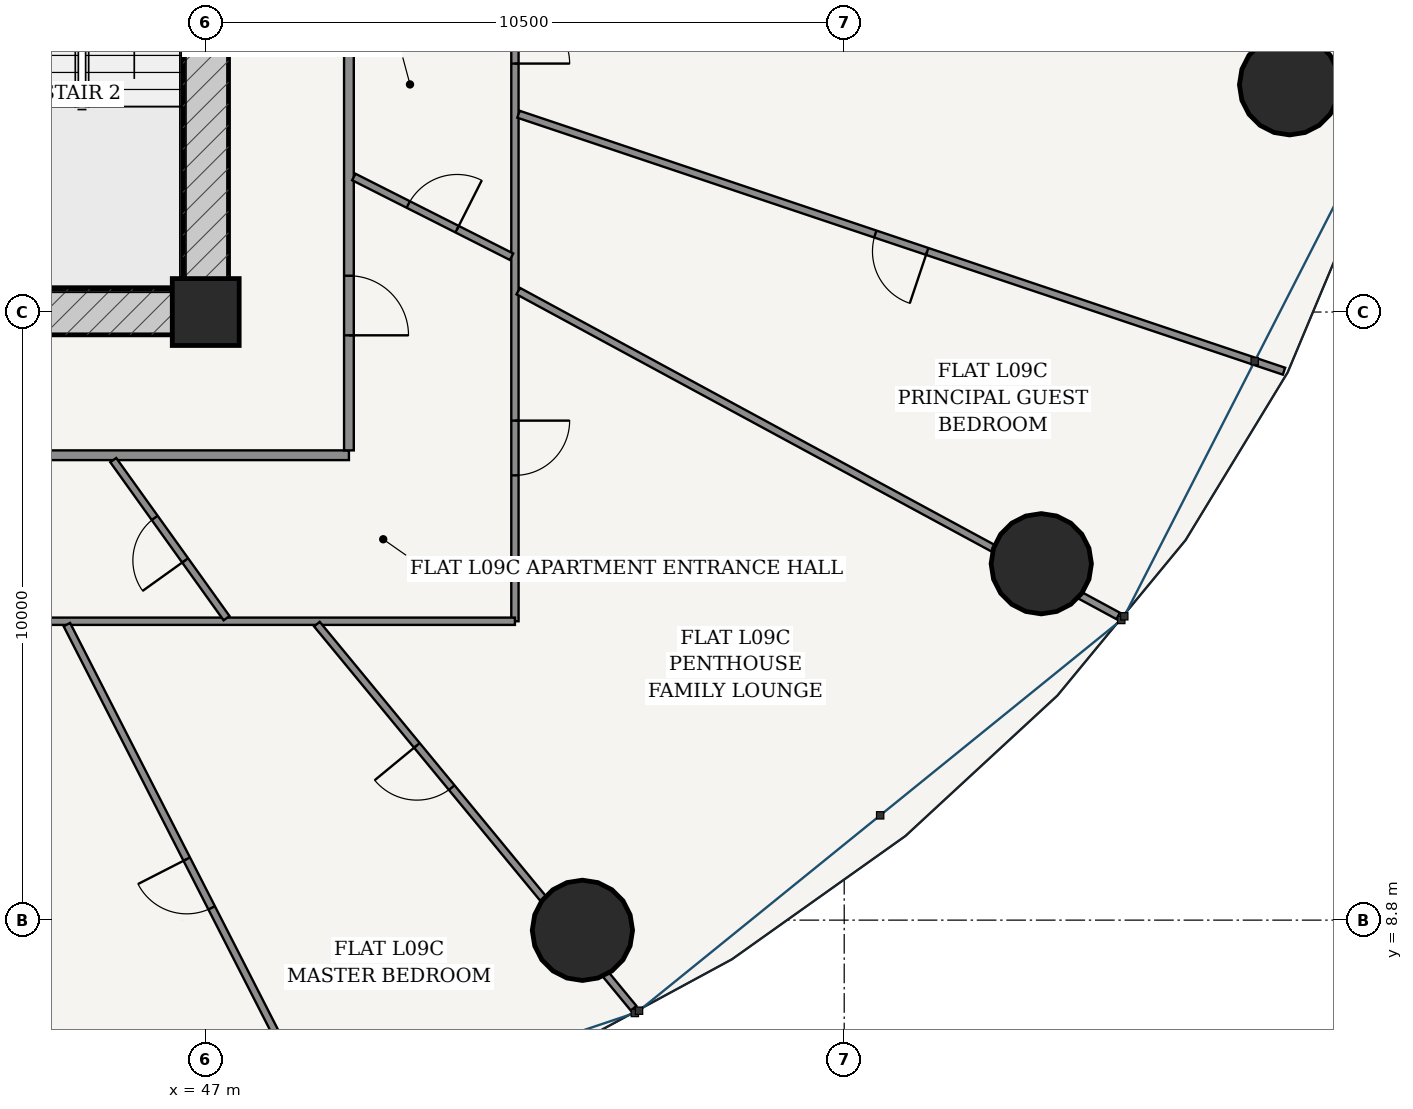
"""IFC4 building model, lengths in metres.
Left out: names, types, materials, properties, quantities, classifications, styles, units other than length and angle.
Written with IfcOpenShell. Run it as: python <this file> out.ifc"""

import sys

from ifc_helpers import new_model, si_unit, direction, frame, frame_2d, origin, origin_2d, place, context, subcontext, project, spatial, rectangle, hollow_circle, extrude, source, transform, mapped, element, fill, save


model = new_model("IFC4")
c1 = context("Model", 3, precision=1e-05, world=origin(), true_north=direction((-0.2419218956, 0.970295726276)))
c2 = subcontext(c1, "Body", "Model", "MODEL_VIEW")
j1 = project(units=[si_unit("LENGTHUNIT", "METRE"), si_unit("PLANEANGLEUNIT", "RADIAN")], contexts=[c1])
p1 = place(None, origin())
s1 = spatial("IfcSite", under=j1, at=p1, CompositionType="ELEMENT")
p2 = place(p1, origin())
s2 = spatial("IfcBuilding", under=s1, at=p2, CompositionType="ELEMENT")
p3 = place(p2, frame((0.0, 0.0, 38.4)))
s3 = spatial("IfcBuildingStorey", under=s2, at=p3, CompositionType="ELEMENT", Elevation=38.4)
p4 = place(p3, frame((47.0, 18.8, 0.0), z_axis=(0.0, 0.0, 1.0), x_axis=(1.0, 0.0, 0.0)))
e1 = element("IfcColumn", 1, at=p4, inside=s3, PredefinedType="COLUMN", context=c2, shape_type="SweptSolid", body=[
    extrude(rectangle(XDim=1.1, YDim=1.1, at=origin_2d()), origin(), (0.0, 0.0, 1.0), 3.6),
])
p5 = place(p3, frame((28.625, 18.8, 0.0), z_axis=(0.0, 0.0, 1.0), x_axis=(1.0, 0.0, 0.0)))
e2 = element("IfcWall", 2, at=p5, inside=s3, PredefinedType="SHEAR", context=c2, shape_type="SweptSolid", body=[
    extrude(rectangle(XDim=18.75, YDim=0.75, at=frame_2d((9.375, 0.0))), origin(), (0.0, 0.0, 1.0), 3.32),
])
p6 = place(p5, frame((6.927, 0.0, 0.0)))
e3 = element("IfcOpeningElement", 3, at=p6, cuts=e2, PredefinedType="OPENING", context=c2, shape_type="SweptSolid", body=[
    extrude(rectangle(XDim=0.85, YDim=2.1, at=frame_2d((0.425, 1.05))), frame((0.0, 0.385, 0.0), z_axis=(0.0, -1.0, 0.0), x_axis=(1.0, 0.0, 0.0)), (0.0, 0.0, 1.0), 0.77),
])
p7 = place(p5, frame((8.95, 0.0, 0.0)))
e4 = element("IfcOpeningElement", 4, at=p7, cuts=e2, PredefinedType="OPENING", context=c2, shape_type="SweptSolid", body=[
    extrude(rectangle(XDim=0.85, YDim=2.1, at=frame_2d((0.425, 1.05))), frame((0.0, 0.385, 0.0), z_axis=(0.0, -1.0, 0.0), x_axis=(1.0, 0.0, 0.0)), (0.0, 0.0, 1.0), 0.77),
])
p8 = place(p5, frame((10.972, 0.0, 0.0)))
e5 = element("IfcOpeningElement", 5, at=p8, cuts=e2, PredefinedType="OPENING", context=c2, shape_type="SweptSolid", body=[
    extrude(rectangle(XDim=0.85, YDim=2.1, at=frame_2d((0.425, 1.05))), frame((0.0, 0.385, 0.0), z_axis=(0.0, -1.0, 0.0), x_axis=(1.0, 0.0, 0.0)), (0.0, 0.0, 1.0), 0.77),
])
p9 = place(p3, frame((47.0, 19.175, 0.0), z_axis=(0.0, 0.0, 1.0), x_axis=(0.0, 1.0, 0.0)))
e6 = element("IfcWall", 6, at=p9, inside=s3, PredefinedType="SHEAR", context=c2, shape_type="SweptSolid", body=[
    extrude(rectangle(XDim=15.25, YDim=0.75, at=frame_2d((7.625, 0.0))), origin(), (0.0, 0.0, 1.0), 3.32),
])
p10 = place(p9, frame((9.875, 0.0, 0.0)))
e7 = element("IfcOpeningElement", 7, at=p10, cuts=e6, PredefinedType="OPENING", context=c2, shape_type="SweptSolid", body=[
    extrude(rectangle(XDim=1.5, YDim=2.2, at=frame_2d((0.75, 1.1))), frame((0.0, 0.385, 0.0), z_axis=(0.0, -1.0, 0.0), x_axis=(1.0, 0.0, 0.0)), (0.0, 0.0, 1.0), 0.77),
])
for number, where, z_axis, x_axis in (
    (8, (53.195, 8.632, 0.0), (0.0, 0.0, 1.0), (1.0, 0.0, 0.0)),
    (9, (60.741, 14.661, 0.0), (0.0, 0.0, 1.0), (1.0, 0.0, 0.0)),
    (10, (64.824, 22.537, 0.0), (0.0, 0.0, 1.0), (1.0, 0.0, 0.0)),
):
    element("IfcColumn", number, at=place(p3, frame(where, z_axis=z_axis, x_axis=x_axis)), inside=s3, PredefinedType="COLUMN", context=c2, shape_type="SweptSolid", body=[
        extrude(hollow_circle(Radius=0.825, WallThickness=0.05, at=origin_2d()), origin(), (0.0, 0.0, 1.0), 3.6),
    ])
p11 = place(p3, frame((26.645, 16.445, 0.0), z_axis=(0.0, 0.0, 1.0), x_axis=(1.0, 0.0, 0.0)))
e11 = element("IfcWall", 11, at=p11, inside=s3, PredefinedType="PARTITIONING", context=c2, shape_type="SweptSolid", body=[
    extrude(rectangle(XDim=22.71, YDim=0.16, at=frame_2d((11.355, 0.0))), origin(), (0.0, 0.0, 1.0), 2.688),
])
p12 = place(p3, frame((49.355, 16.525, 0.0), z_axis=(0.0, 0.0, 1.0), x_axis=(0.0, 1.0, 0.0)))
e12 = element("IfcWall", 12, at=p12, inside=s3, PredefinedType="PARTITIONING", context=c2, shape_type="SweptSolid", body=[
    extrude(rectangle(XDim=20.55, YDim=0.16, at=frame_2d((10.275, 0.0))), origin(), (0.0, 0.0, 1.0), 2.688),
])
p13 = place(p12, frame((17.207, 0.0, 0.0)))
e13 = element("IfcOpeningElement", 13, at=p13, cuts=e12, PredefinedType="OPENING", context=c2, shape_type="SweptSolid", body=[
    extrude(rectangle(XDim=0.98, YDim=2.2, at=frame_2d((0.49, 1.1))), frame((0.0, 0.09, 0.0), z_axis=(0.0, -1.0, 0.0), x_axis=(1.0, 0.0, 0.0)), (0.0, 0.0, 1.0), 0.18),
])
p14 = place(p12, frame((1.892, 0.0, 0.0)))
e14 = element("IfcOpeningElement", 14, at=p14, cuts=e12, PredefinedType="OPENING", context=c2, shape_type="SweptSolid", body=[
    extrude(rectangle(XDim=0.98, YDim=2.2, at=frame_2d((0.49, 1.1))), frame((0.0, 0.09, 0.0), z_axis=(0.0, -1.0, 0.0), x_axis=(1.0, 0.0, 0.0)), (0.0, 0.0, 1.0), 0.18),
])
p15 = place(p3, frame((52.085, 28.968, 0.0), z_axis=(0.0, 0.0, 1.0), x_axis=(0.0, -1.0, 0.0)))
e15 = element("IfcWall", 15, at=p15, inside=s3, PredefinedType="PARTITIONING", context=c2, shape_type="SweptSolid", body=[
    extrude(rectangle(XDim=15.253, YDim=0.12, at=frame_2d((7.626, 0.0))), origin(), (0.0, 0.0, 1.0), 2.688),
])
p16 = place(p15, frame((11.954, 0.0, 0.0)))
e16 = element("IfcOpeningElement", 16, at=p16, cuts=e15, PredefinedType="OPENING", context=c2, shape_type="SweptSolid", body=[
    extrude(rectangle(XDim=0.9, YDim=2.15, at=frame_2d((0.45, 1.075))), frame((0.0, 0.07, 0.0), z_axis=(0.0, -1.0, 0.0), x_axis=(1.0, 0.0, 0.0)), (0.0, 0.0, 1.0), 0.14),
])
p17 = place(p15, frame((5.182, 0.0, 0.0)))
e17 = element("IfcOpeningElement", 17, at=p17, cuts=e15, PredefinedType="OPENING", context=c2, shape_type="SweptSolid", body=[
    extrude(rectangle(XDim=0.9, YDim=2.15, at=frame_2d((0.45, 1.075))), frame((0.0, 0.07, 0.0), z_axis=(0.0, -1.0, 0.0), x_axis=(1.0, 0.0, 0.0)), (0.0, 0.0, 1.0), 0.14),
])
p18 = place(p15, frame((1.889, 0.0, 0.0)))
e18 = element("IfcOpeningElement", 18, at=p18, cuts=e15, PredefinedType="OPENING", context=c2, shape_type="SweptSolid", body=[
    extrude(rectangle(XDim=0.9, YDim=2.15, at=frame_2d((0.45, 1.075))), frame((0.0, 0.07, 0.0), z_axis=(0.0, -1.0, 0.0), x_axis=(1.0, 0.0, 0.0)), (0.0, 0.0, 1.0), 0.14),
])
p19 = place(p3, frame((52.085, 13.715, 0.0), z_axis=(0.0, 0.0, 1.0), x_axis=(-1.0, 0.0, 0.0)))
e19 = element("IfcWall", 19, at=p19, inside=s3, PredefinedType="PARTITIONING", context=c2, shape_type="SweptSolid", body=[
    extrude(rectangle(XDim=24.772, YDim=0.12, at=frame_2d((12.386, 0.0))), origin(), (0.0, 0.0, 1.0), 2.688),
])
p20 = place(p19, frame((20.912, 0.0, 0.0)))
e20 = element("IfcOpeningElement", 20, at=p20, cuts=e19, PredefinedType="OPENING", context=c2, shape_type="SweptSolid", body=[
    extrude(rectangle(XDim=0.86, YDim=2.15, at=frame_2d((0.43, 1.075))), frame((0.0, 0.07, 0.0), z_axis=(0.0, -1.0, 0.0), x_axis=(1.0, 0.0, 0.0)), (0.0, 0.0, 1.0), 0.14),
])
p21 = place(p19, frame((13.87, 0.0, 0.0)))
e21 = element("IfcOpeningElement", 21, at=p21, cuts=e19, PredefinedType="OPENING", context=c2, shape_type="SweptSolid", body=[
    extrude(rectangle(XDim=0.9, YDim=2.15, at=frame_2d((0.45, 1.075))), frame((0.0, 0.07, 0.0), z_axis=(0.0, -1.0, 0.0), x_axis=(1.0, 0.0, 0.0)), (0.0, 0.0, 1.0), 0.14),
])
p22 = place(p3, frame((44.717, 13.66, 0.0), z_axis=(0.0, 0.0, 1.0), x_axis=(0.455131303234, -0.890424335256, 0.0)))
e22 = element("IfcWall", 22, at=p22, inside=s3, PredefinedType="PARTITIONING", context=c2, shape_type="SweptSolid", body=[
    extrude(rectangle(XDim=9.562, YDim=0.12, at=frame_2d((4.781, 0.0))), origin(), (0.0, 0.0, 1.0), 2.762),
])
p23 = place(p22, frame((4.331, 0.0, 0.0)))
e23 = element("IfcOpeningElement", 23, at=p23, cuts=e22, PredefinedType="OPENING", context=c2, shape_type="SweptSolid", body=[
    extrude(rectangle(XDim=0.9, YDim=2.15, at=frame_2d((0.45, 1.075))), frame((0.0, 0.07, 0.0), z_axis=(0.0, -1.0, 0.0), x_axis=(1.0, 0.0, 0.0)), (0.0, 0.0, 1.0), 0.14),
])
p24 = place(p3, frame((48.829, 13.667, 0.0), z_axis=(0.0, 0.0, 1.0), x_axis=(0.636177533893, -0.771542704826, 0.0)))
e24 = element("IfcWall", 24, at=p24, inside=s3, PredefinedType="PARTITIONING", context=c2, shape_type="SweptSolid", body=[
    extrude(rectangle(XDim=8.187, YDim=0.12, at=frame_2d((4.093, 0.0))), origin(), (0.0, 0.0, 1.0), 2.688),
])
p25 = place(p24, frame((2.584, 0.0, 0.0)))
e25 = element("IfcOpeningElement", 25, at=p25, cuts=e24, PredefinedType="OPENING", context=c2, shape_type="SweptSolid", body=[
    extrude(rectangle(XDim=0.9, YDim=2.15, at=frame_2d((0.45, 1.075))), frame((0.0, 0.07, 0.0), z_axis=(0.0, -1.0, 0.0), x_axis=(1.0, 0.0, 0.0)), (0.0, 0.0, 1.0), 0.14),
])
p26 = place(p3, frame((52.139, 19.144, 0.0), z_axis=(0.0, 0.0, 1.0), x_axis=(0.879372452045, -0.476134529922, 0.0)))
e26 = element("IfcWall", 26, at=p26, inside=s3, PredefinedType="PARTITIONING", context=c2, shape_type="SweptSolid", body=[
    extrude(rectangle(XDim=11.219, YDim=0.12, at=frame_2d((5.61, 0.0))), origin(), (0.0, 0.0, 1.0), 2.688),
])
p27 = place(p3, frame((52.144, 22.052, 0.0), z_axis=(0.0, 0.0, 1.0), x_axis=(0.948023034133, -0.318201707653, 0.0)))
e27 = element("IfcWall", 27, at=p27, inside=s3, PredefinedType="PARTITIONING", context=c2, shape_type="SweptSolid", body=[
    extrude(rectangle(XDim=13.279, YDim=0.12, at=frame_2d((6.639, 0.0))), origin(), (0.0, 0.0, 1.0), 2.762),
])
p28 = place(p27, frame((6.189, 0.0, 0.0)))
e28 = element("IfcOpeningElement", 28, at=p28, cuts=e27, PredefinedType="OPENING", context=c2, shape_type="SweptSolid", body=[
    extrude(rectangle(XDim=0.9, YDim=2.15, at=frame_2d((0.45, 1.075))), frame((0.0, 0.07, 0.0), z_axis=(0.0, -1.0, 0.0), x_axis=(1.0, 0.0, 0.0)), (0.0, 0.0, 1.0), 0.14),
])
p29 = place(p3, frame((45.48, 16.365, 0.0), z_axis=(0.0, 0.0, 1.0), x_axis=(0.582566008831, -0.812783393872, 0.0)))
e29 = element("IfcWall", 29, at=p29, inside=s3, PredefinedType="PARTITIONING", context=c2, shape_type="SweptSolid", body=[
    extrude(rectangle(XDim=3.198, YDim=0.12, at=frame_2d((1.599, 0.0))), origin(), (0.0, 0.0, 1.0), 3.32),
])
p30 = place(p29, frame((1.169, 0.0, 0.0)))
e30 = element("IfcOpeningElement", 30, at=p30, cuts=e29, PredefinedType="OPENING", context=c2, shape_type="SweptSolid", body=[
    extrude(rectangle(XDim=0.86, YDim=2.15, at=frame_2d((0.43, 1.075))), frame((0.0, 0.07, 0.0), z_axis=(0.0, -1.0, 0.0), x_axis=(1.0, 0.0, 0.0)), (0.0, 0.0, 1.0), 0.14),
])
p31 = place(p3, frame((49.435, 21.021, 0.0), z_axis=(0.0, 0.0, 1.0), x_axis=(0.892504324967, -0.451038834155, 0.0)))
e31 = element("IfcWall", 31, at=p31, inside=s3, PredefinedType="PARTITIONING", context=c2, shape_type="SweptSolid", body=[
    extrude(rectangle(XDim=2.907, YDim=0.12, at=frame_2d((1.454, 0.0))), origin(), (0.0, 0.0, 1.0), 3.32),
])
p32 = place(p31, frame((1.004, 0.0, 0.0)))
e32 = element("IfcOpeningElement", 32, at=p32, cuts=e31, PredefinedType="OPENING", context=c2, shape_type="SweptSolid", body=[
    extrude(rectangle(XDim=0.9, YDim=2.15, at=frame_2d((0.45, 1.075))), frame((0.0, 0.07, 0.0), z_axis=(0.0, -1.0, 0.0), x_axis=(1.0, 0.0, 0.0)), (0.0, 0.0, 1.0), 0.14),
])
m1 = source(origin(), c2, "Body", "SweptSolid", [
    extrude(rectangle(XDim=0.98, YDim=2.2, at=frame_2d((0.49, 1.1))), frame((0.0, 0.025, 0.0), z_axis=(0.0, -1.0, 0.0), x_axis=(1.0, 0.0, 0.0)), (0.0, 0.0, 1.0), 0.05),
])
p33 = place(p14, frame((0.98, 0.0, 0.0), z_axis=(0.0, 0.0, 1.0), x_axis=(-1.0, 0.0, 0.0)))
e33 = element("IfcDoor", 33, at=p33, inside=s3, OperationType="SINGLE_SWING_RIGHT", PredefinedType="DOOR", context=c2, shape_type="MappedRepresentation", body=[
    mapped(m1, transform((0.0, 0.0, 0.0), scale=1.0)),
])
fill(e14, e33)
m2 = source(origin(), c2, "Body", "SweptSolid", [
    extrude(rectangle(XDim=0.86, YDim=2.15, at=frame_2d((0.43, 1.075))), frame((0.0, 0.025, 0.0), z_axis=(0.0, -1.0, 0.0), x_axis=(1.0, 0.0, 0.0)), (0.0, 0.0, 1.0), 0.05),
])
p34 = place(p30, frame((0.86, 0.0, 0.0), z_axis=(0.0, 0.0, 1.0), x_axis=(-1.0, 0.0, 0.0)))
e34 = element("IfcDoor", 34, at=p34, inside=s3, OperationType="SINGLE_SWING_LEFT", PredefinedType="DOOR", context=c2, shape_type="MappedRepresentation", body=[
    mapped(m2, transform((0.0, 0.0, 0.0), scale=1.0)),
])
fill(e30, e34)
m3 = source(origin(), c2, "Body", "SweptSolid", [
    extrude(rectangle(XDim=0.9, YDim=2.15, at=frame_2d((0.45, 1.075))), frame((0.0, 0.025, 0.0), z_axis=(0.0, -1.0, 0.0), x_axis=(1.0, 0.0, 0.0)), (0.0, 0.0, 1.0), 0.05),
])
p35 = place(p32, origin())
e35 = element("IfcDoor", 35, at=p35, inside=s3, OperationType="SINGLE_SWING_RIGHT", PredefinedType="DOOR", context=c2, shape_type="MappedRepresentation", body=[
    mapped(m3, transform((0.0, 0.0, 0.0), scale=1.0)),
])
fill(e32, e35)
p36 = place(p16, origin())
e36 = element("IfcDoor", 36, at=p36, inside=s3, OperationType="SINGLE_SWING_LEFT", PredefinedType="DOOR", context=c2, shape_type="MappedRepresentation", body=[
    mapped(m3, transform((0.0, 0.0, 0.0), scale=1.0)),
])
fill(e16, e36)
p37 = place(p17, origin())
e37 = element("IfcDoor", 37, at=p37, inside=s3, OperationType="SINGLE_SWING_RIGHT", PredefinedType="DOOR", context=c2, shape_type="MappedRepresentation", body=[
    mapped(m3, transform((0.0, 0.0, 0.0), scale=1.0)),
])
fill(e17, e37)
p38 = place(p25, frame((0.9, 0.0, 0.0), z_axis=(0.0, 0.0, 1.0), x_axis=(-1.0, 0.0, 0.0)))
e38 = element("IfcDoor", 38, at=p38, inside=s3, OperationType="SINGLE_SWING_RIGHT", PredefinedType="DOOR", context=c2, shape_type="MappedRepresentation", body=[
    mapped(m3, transform((0.0, 0.0, 0.0), scale=1.0)),
])
fill(e25, e38)
p39 = place(p28, frame((0.9, 0.0, 0.0), z_axis=(0.0, 0.0, 1.0), x_axis=(-1.0, 0.0, 0.0)))
e39 = element("IfcDoor", 39, at=p39, inside=s3, OperationType="SINGLE_SWING_LEFT", PredefinedType="DOOR", context=c2, shape_type="MappedRepresentation", body=[
    mapped(m3, transform((0.0, 0.0, 0.0), scale=1.0)),
])
fill(e28, e39)
p40 = place(p23, frame((0.9, 0.0, 0.0), z_axis=(0.0, 0.0, 1.0), x_axis=(-1.0, 0.0, 0.0)))
e40 = element("IfcDoor", 40, at=p40, inside=s3, OperationType="SINGLE_SWING_RIGHT", PredefinedType="DOOR", context=c2, shape_type="MappedRepresentation", body=[
    mapped(m3, transform((0.0, 0.0, 0.0), scale=1.0)),
])
fill(e23, e40)
save(model, sys.argv[1])
